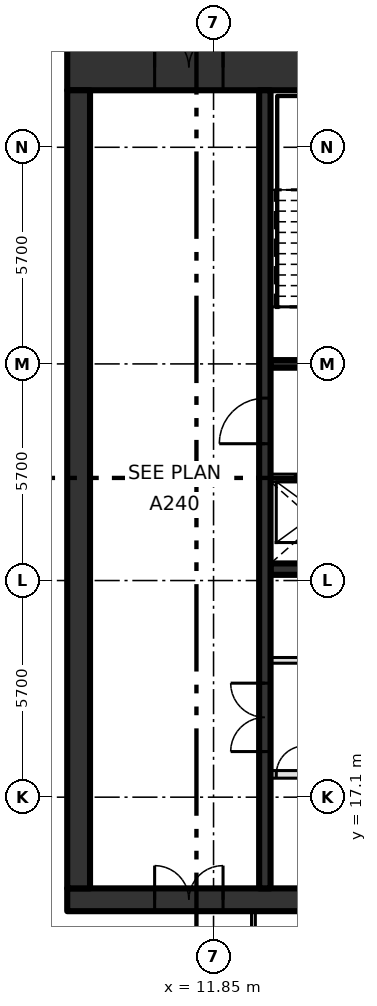
"""IFC4 building model, lengths in metres.
Left out: names, types, materials, properties, quantities, classifications, styles, units other than length and angle.
Written with IfcOpenShell. Run it as: python <this file> out.ifc"""

import sys

from ifc_helpers import new_model, si_unit, direction, frame, frame_2d, origin, place, context, subcontext, project, spatial, rectangle, extrude, element, fill, save


model = new_model("IFC4")
c1 = context("Model", 3, precision=1e-05, world=origin(), true_north=direction((0.0, 1.0)))
c2 = subcontext(c1, "Body", "Model", "MODEL_VIEW")
j1 = project(units=[si_unit("LENGTHUNIT", "METRE"), si_unit("PLANEANGLEUNIT", "RADIAN")], contexts=[c1])
p1 = place(None, origin())
s1 = spatial("IfcSite", under=j1, at=p1, CompositionType="ELEMENT")
p2 = place(p1, origin())
s2 = spatial("IfcBuilding", under=s1, at=p2, CompositionType="ELEMENT")
p3 = place(p2, frame((0.0, 0.0, 294.0)))
s3 = spatial("IfcBuildingStorey", under=s2, at=p3, CompositionType="ELEMENT", Elevation=294.0)
p4 = place(p3, frame((8.0, 14.4, -0.3), z_axis=(0.0, 0.0, 1.0), x_axis=(1.0, 0.0, 0.0)))
e1 = element("IfcWall", 1, at=p4, inside=s3, PredefinedType="SHEAR", context=c2, shape_type="SweptSolid", body=[
    extrude(rectangle(XDim=22.8, YDim=0.6, at=frame_2d((11.4, 0.0))), origin(), (0.0, 0.0, 1.0), 4.2),
])
p5 = place(p4, frame((2.3, 0.0, 0.3)))
e2 = element("IfcOpeningElement", 2, at=p5, cuts=e1, PredefinedType="OPENING", context=c2, shape_type="SweptSolid", body=[
    extrude(rectangle(XDim=1.8, YDim=2.1, at=frame_2d((0.9, 1.05))), frame((0.0, 0.31, 0.0), z_axis=(0.0, -1.0, 0.0), x_axis=(1.0, 0.0, 0.0)), (0.0, 0.0, 1.0), 0.62),
])
p6 = place(p3, frame((8.0, 36.3, -0.3), z_axis=(0.0, 0.0, 1.0), x_axis=(1.0, 0.0, 0.0)))
e3 = element("IfcWall", 3, at=p6, inside=s3, PredefinedType="SHEAR", context=c2, shape_type="SweptSolid", body=[
    extrude(rectangle(XDim=22.8, YDim=1.2, at=frame_2d((11.4, 0.0))), origin(), (0.0, 0.0, 1.0), 4.2),
])
p7 = place(p6, frame((2.3, 0.0, 0.3)))
e4 = element("IfcOpeningElement", 4, at=p7, cuts=e3, PredefinedType="OPENING", context=c2, shape_type="SweptSolid", body=[
    extrude(rectangle(XDim=1.8, YDim=2.1, at=frame_2d((0.9, 1.05))), frame((0.0, 0.61, 0.0), z_axis=(0.0, -1.0, 0.0), x_axis=(1.0, 0.0, 0.0)), (0.0, 0.0, 1.0), 1.22),
])
p8 = place(p3, frame((8.3, 14.7, -0.3), z_axis=(0.0, 0.0, 1.0), x_axis=(0.0, 1.0, 0.0)))
e5 = element("IfcWall", 5, at=p8, inside=s3, PredefinedType="SHEAR", context=c2, shape_type="SweptSolid", body=[
    extrude(rectangle(XDim=21.0, YDim=0.6, at=frame_2d((10.5, 0.0))), origin(), (0.0, 0.0, 1.0), 4.2),
])
p9 = place(p3, frame((13.35, 17.7, 0.0), z_axis=(0.0, 0.0, 1.0), x_axis=(1.0, 0.0, 0.0)))
e6 = element("IfcWall", 6, at=p9, inside=s3, PredefinedType="SOLIDWALL", context=c2, shape_type="SweptSolid", body=[
    extrude(rectangle(XDim=13.425, YDim=0.2, at=frame_2d((6.712, 0.0))), origin(), (0.0, 0.0, 1.0), 3.9),
])
p10 = place(p9, frame((2.0, 0.0, 0.0)))
e7 = element("IfcOpeningElement", 7, at=p10, cuts=e6, PredefinedType="OPENING", context=c2, shape_type="SweptSolid", body=[
    extrude(rectangle(XDim=1.1, YDim=2.1, at=frame_2d((0.55, 1.05))), frame((0.0, 0.11, 0.0), z_axis=(0.0, -1.0, 0.0), x_axis=(1.0, 0.0, 0.0)), (0.0, 0.0, 1.0), 0.22),
])
p11 = place(p9, frame((4.7, 0.0, 0.0)))
e8 = element("IfcOpeningElement", 8, at=p11, cuts=e6, PredefinedType="OPENING", context=c2, shape_type="SweptSolid", body=[
    extrude(rectangle(XDim=1.1, YDim=2.1, at=frame_2d((0.55, 1.05))), frame((0.0, 0.11, 0.0), z_axis=(0.0, -1.0, 0.0), x_axis=(1.0, 0.0, 0.0)), (0.0, 0.0, 1.0), 0.22),
])
p12 = place(p9, frame((7.4, 0.0, 0.0)))
e9 = element("IfcOpeningElement", 9, at=p12, cuts=e6, PredefinedType="OPENING", context=c2, shape_type="SweptSolid", body=[
    extrude(rectangle(XDim=1.1, YDim=2.1, at=frame_2d((0.55, 1.05))), frame((0.0, 0.11, 0.0), z_axis=(0.0, -1.0, 0.0), x_axis=(1.0, 0.0, 0.0)), (0.0, 0.0, 1.0), 0.22),
])
p13 = place(p9, frame((10.1, 0.0, 0.0)))
e10 = element("IfcOpeningElement", 10, at=p13, cuts=e6, PredefinedType="OPENING", context=c2, shape_type="SweptSolid", body=[
    extrude(rectangle(XDim=1.1, YDim=2.1, at=frame_2d((0.55, 1.05))), frame((0.0, 0.11, 0.0), z_axis=(0.0, -1.0, 0.0), x_axis=(1.0, 0.0, 0.0)), (0.0, 0.0, 1.0), 0.22),
])
p14 = place(p9, frame((0.15, 0.0, 0.0)))
e11 = element("IfcOpeningElement", 11, at=p14, cuts=e6, PredefinedType="OPENING", context=c2, shape_type="SweptSolid", body=[
    extrude(rectangle(XDim=0.75, YDim=2.1, at=frame_2d((0.375, 1.05))), frame((0.0, 0.11, 0.0), z_axis=(0.0, -1.0, 0.0), x_axis=(1.0, 0.0, 0.0)), (0.0, 0.0, 1.0), 0.22),
])
p15 = place(p9, frame((12.3, 0.0, 0.0)))
e12 = element("IfcOpeningElement", 12, at=p15, cuts=e6, PredefinedType="OPENING", context=c2, shape_type="SweptSolid", body=[
    extrude(rectangle(XDim=0.75, YDim=2.1, at=frame_2d((0.375, 1.05))), frame((0.0, 0.11, 0.0), z_axis=(0.0, -1.0, 0.0), x_axis=(1.0, 0.0, 0.0)), (0.0, 0.0, 1.0), 0.22),
])
p16 = place(p3, frame((13.35, 20.7, 0.0), z_axis=(0.0, 0.0, 1.0), x_axis=(1.0, 0.0, 0.0)))
e13 = element("IfcWall", 13, at=p16, inside=s3, PredefinedType="PARTITIONING", context=c2, shape_type="SweptSolid", body=[
    extrude(rectangle(XDim=13.45, YDim=0.15, at=frame_2d((6.725, 0.0))), origin(), (0.0, 0.0, 1.0), 3.9),
])
p17 = place(p16, frame((2.1, 0.0, 0.0)))
e14 = element("IfcOpeningElement", 14, at=p17, cuts=e13, PredefinedType="OPENING", context=c2, shape_type="SweptSolid", body=[
    extrude(rectangle(XDim=0.9, YDim=2.1, at=frame_2d((0.45, 1.05))), frame((0.0, 0.085, 0.0), z_axis=(0.0, -1.0, 0.0), x_axis=(1.0, 0.0, 0.0)), (0.0, 0.0, 1.0), 0.17),
])
p18 = place(p16, frame((8.85, 0.0, 0.0)))
e15 = element("IfcOpeningElement", 15, at=p18, cuts=e13, PredefinedType="OPENING", context=c2, shape_type="SweptSolid", body=[
    extrude(rectangle(XDim=0.9, YDim=2.1, at=frame_2d((0.45, 1.05))), frame((0.0, 0.085, 0.0), z_axis=(0.0, -1.0, 0.0), x_axis=(1.0, 0.0, 0.0)), (0.0, 0.0, 1.0), 0.17),
])
p19 = place(p3, frame((13.35, 23.1, 0.0), z_axis=(0.0, 0.0, 1.0), x_axis=(1.0, 0.0, 0.0)))
e16 = element("IfcWall", 16, at=p19, inside=s3, PredefinedType="SHEAR", context=c2, shape_type="SweptSolid", body=[
    extrude(rectangle(XDim=16.85, YDim=0.3, at=frame_2d((8.425, 0.0))), origin(), (0.0, 0.0, 1.0), 3.9),
])
p20 = place(p3, frame((13.35, 25.5, 0.0), z_axis=(0.0, 0.0, 1.0), x_axis=(1.0, 0.0, 0.0)))
e17 = element("IfcWall", 17, at=p20, inside=s3, PredefinedType="SOLIDWALL", context=c2, shape_type="SweptSolid", body=[
    extrude(rectangle(XDim=16.85, YDim=0.2, at=frame_2d((8.425, 0.0))), origin(), (0.0, 0.0, 1.0), 3.9),
])
p21 = place(p20, frame((0.65, 0.0, 0.0)))
e18 = element("IfcOpeningElement", 18, at=p21, cuts=e17, PredefinedType="OPENING", context=c2, shape_type="SweptSolid", body=[
    extrude(rectangle(XDim=1.1, YDim=2.1, at=frame_2d((0.55, 1.05))), frame((0.0, 0.11, 0.0), z_axis=(0.0, -1.0, 0.0), x_axis=(1.0, 0.0, 0.0)), (0.0, 0.0, 1.0), 0.22),
])
p22 = place(p20, frame((3.35, 0.0, 0.0)))
e19 = element("IfcOpeningElement", 19, at=p22, cuts=e17, PredefinedType="OPENING", context=c2, shape_type="SweptSolid", body=[
    extrude(rectangle(XDim=1.1, YDim=2.1, at=frame_2d((0.55, 1.05))), frame((0.0, 0.11, 0.0), z_axis=(0.0, -1.0, 0.0), x_axis=(1.0, 0.0, 0.0)), (0.0, 0.0, 1.0), 0.22),
])
p23 = place(p20, frame((6.05, 0.0, 0.0)))
e20 = element("IfcOpeningElement", 20, at=p23, cuts=e17, PredefinedType="OPENING", context=c2, shape_type="SweptSolid", body=[
    extrude(rectangle(XDim=1.1, YDim=2.1, at=frame_2d((0.55, 1.05))), frame((0.0, 0.11, 0.0), z_axis=(0.0, -1.0, 0.0), x_axis=(1.0, 0.0, 0.0)), (0.0, 0.0, 1.0), 0.22),
])
p24 = place(p20, frame((8.75, 0.0, 0.0)))
e21 = element("IfcOpeningElement", 21, at=p24, cuts=e17, PredefinedType="OPENING", context=c2, shape_type="SweptSolid", body=[
    extrude(rectangle(XDim=1.1, YDim=2.1, at=frame_2d((0.55, 1.05))), frame((0.0, 0.11, 0.0), z_axis=(0.0, -1.0, 0.0), x_axis=(1.0, 0.0, 0.0)), (0.0, 0.0, 1.0), 0.22),
])
p25 = place(p3, frame((13.35, 28.5, 0.0), z_axis=(0.0, 0.0, 1.0), x_axis=(1.0, 0.0, 0.0)))
e22 = element("IfcWall", 22, at=p25, inside=s3, PredefinedType="SOLIDWALL", context=c2, shape_type="SweptSolid", body=[
    extrude(rectangle(XDim=6.75, YDim=0.2, at=frame_2d((3.375, 0.0))), origin(), (0.0, 0.0, 1.0), 3.9),
])
p26 = place(p25, frame((0.95, 0.0, 0.0)))
e23 = element("IfcOpeningElement", 23, at=p26, cuts=e22, PredefinedType="OPENING", context=c2, shape_type="SweptSolid", body=[
    extrude(rectangle(XDim=1.2, YDim=2.1, at=frame_2d((0.6, 1.05))), frame((0.0, 0.11, 0.0), z_axis=(0.0, -1.0, 0.0), x_axis=(1.0, 0.0, 0.0)), (0.0, 0.0, 1.0), 0.22),
])
p27 = place(p25, frame((3.75, 0.0, 0.0)))
e24 = element("IfcOpeningElement", 24, at=p27, cuts=e22, PredefinedType="OPENING", context=c2, shape_type="SweptSolid", body=[
    extrude(rectangle(XDim=1.1, YDim=2.1, at=frame_2d((0.55, 1.05))), frame((0.0, 0.11, 0.0), z_axis=(0.0, -1.0, 0.0), x_axis=(1.0, 0.0, 0.0)), (0.0, 0.0, 1.0), 0.22),
])
p28 = place(p3, frame((13.2, 14.7, 0.0), z_axis=(0.0, 0.0, 1.0), x_axis=(0.0, 1.0, 0.0)))
e25 = element("IfcWall", 25, at=p28, inside=s3, PredefinedType="SHEAR", context=c2, shape_type="SweptSolid", body=[
    extrude(rectangle(XDim=21.0, YDim=0.3, at=frame_2d((10.5, 0.0))), origin(), (0.0, 0.0, 1.0), 3.9),
])
p29 = place(p28, frame((3.6, 0.0, 0.0)))
e26 = element("IfcOpeningElement", 26, at=p29, cuts=e25, PredefinedType="OPENING", context=c2, shape_type="SweptSolid", body=[
    extrude(rectangle(XDim=1.8, YDim=2.1, at=frame_2d((0.9, 1.05))), frame((0.0, 0.16, 0.0), z_axis=(0.0, -1.0, 0.0), x_axis=(1.0, 0.0, 0.0)), (0.0, 0.0, 1.0), 0.32),
])
p30 = place(p28, frame((11.7, 0.0, 0.0)))
e27 = element("IfcOpeningElement", 27, at=p30, cuts=e25, PredefinedType="OPENING", context=c2, shape_type="SweptSolid", body=[
    extrude(rectangle(XDim=1.2, YDim=2.1, at=frame_2d((0.6, 1.05))), frame((0.0, 0.16, 0.0), z_axis=(0.0, -1.0, 0.0), x_axis=(1.0, 0.0, 0.0)), (0.0, 0.0, 1.0), 0.32),
])
p31 = place(p3, frame((12.9, 10.078, 0.0), z_axis=(0.0, 0.0, 1.0), x_axis=(0.0, 1.0, 0.0)))
e28 = element("IfcWall", 28, at=p31, inside=s3, PredefinedType="PARTITIONING", context=c2, shape_type="SweptSolid", body=[
    extrude(rectangle(XDim=4.022, YDim=0.1, at=frame_2d((2.011, 0.0))), origin(), (0.0, 0.0, 1.0), 3.9),
])
p32 = place(p31, frame((1.68, 0.0, 0.0)))
e29 = element("IfcOpeningElement", 29, at=p32, cuts=e28, PredefinedType="OPENING", context=c2, shape_type="SweptSolid", body=[
    extrude(rectangle(XDim=1.0, YDim=2.1, at=frame_2d((0.5, 1.05))), frame((0.0, 0.06, 0.0), z_axis=(0.0, -1.0, 0.0), x_axis=(1.0, 0.0, 0.0)), (0.0, 0.0, 1.0), 0.12),
])
p33 = place(p21, origin())
e30 = element("IfcDoor", 30, at=p33, inside=s3, OperationType="SLIDING_TO_LEFT", PredefinedType="DOOR", context=c2, shape_type="SweptSolid", body=[
    extrude(rectangle(XDim=1.1, YDim=2.1, at=frame_2d((0.55, 1.05))), frame((0.0, 0.025, 0.0), z_axis=(0.0, -1.0, 0.0), x_axis=(1.0, 0.0, 0.0)), (0.0, 0.0, 1.0), 0.05),
])
fill(e18, e30)
p34 = place(p14, origin())
e31 = element("IfcDoor", 31, at=p34, inside=s3, OperationType="SINGLE_SWING_RIGHT", PredefinedType="DOOR", context=c2, shape_type="SweptSolid", body=[
    extrude(rectangle(XDim=0.75, YDim=2.1, at=frame_2d((0.375, 1.05))), frame((0.0, 0.025, 0.0), z_axis=(0.0, -1.0, 0.0), x_axis=(1.0, 0.0, 0.0)), (0.0, 0.0, 1.0), 0.05),
])
fill(e11, e31)
p35 = place(p29, origin())
e32 = element("IfcDoor", 32, at=p35, inside=s3, OperationType="DOUBLE_DOOR_SINGLE_SWING", PredefinedType="DOOR", context=c2, shape_type="SweptSolid", body=[
    extrude(rectangle(XDim=1.8, YDim=2.1, at=frame_2d((0.9, 1.05))), frame((0.0, 0.025, 0.0), z_axis=(0.0, -1.0, 0.0), x_axis=(1.0, 0.0, 0.0)), (0.0, 0.0, 1.0), 0.05),
])
fill(e26, e32)
p36 = place(p30, origin())
e33 = element("IfcDoor", 33, at=p36, inside=s3, OperationType="SINGLE_SWING_LEFT", PredefinedType="DOOR", context=c2, shape_type="SweptSolid", body=[
    extrude(rectangle(XDim=1.2, YDim=2.1, at=frame_2d((0.6, 1.05))), frame((0.0, 0.025, 0.0), z_axis=(0.0, -1.0, 0.0), x_axis=(1.0, 0.0, 0.0)), (0.0, 0.0, 1.0), 0.05),
])
fill(e27, e33)
p37 = place(p7, origin())
e34 = element("IfcDoor", 34, at=p37, inside=s3, OperationType="DOUBLE_DOOR_SINGLE_SWING", PredefinedType="DOOR", context=c2, shape_type="SweptSolid", body=[
    extrude(rectangle(XDim=1.8, YDim=2.1, at=frame_2d((0.9, 1.05))), frame((0.0, 0.025, 0.0), z_axis=(0.0, -1.0, 0.0), x_axis=(1.0, 0.0, 0.0)), (0.0, 0.0, 1.0), 0.05),
])
fill(e4, e34)
p38 = place(p5, origin())
e35 = element("IfcDoor", 35, at=p38, inside=s3, OperationType="DOUBLE_DOOR_SINGLE_SWING", PredefinedType="DOOR", context=c2, shape_type="SweptSolid", body=[
    extrude(rectangle(XDim=1.8, YDim=2.1, at=frame_2d((0.9, 1.05))), frame((0.0, 0.025, 0.0), z_axis=(0.0, -1.0, 0.0), x_axis=(1.0, 0.0, 0.0)), (0.0, 0.0, 1.0), 0.05),
])
fill(e2, e35)
save(model, sys.argv[1])
